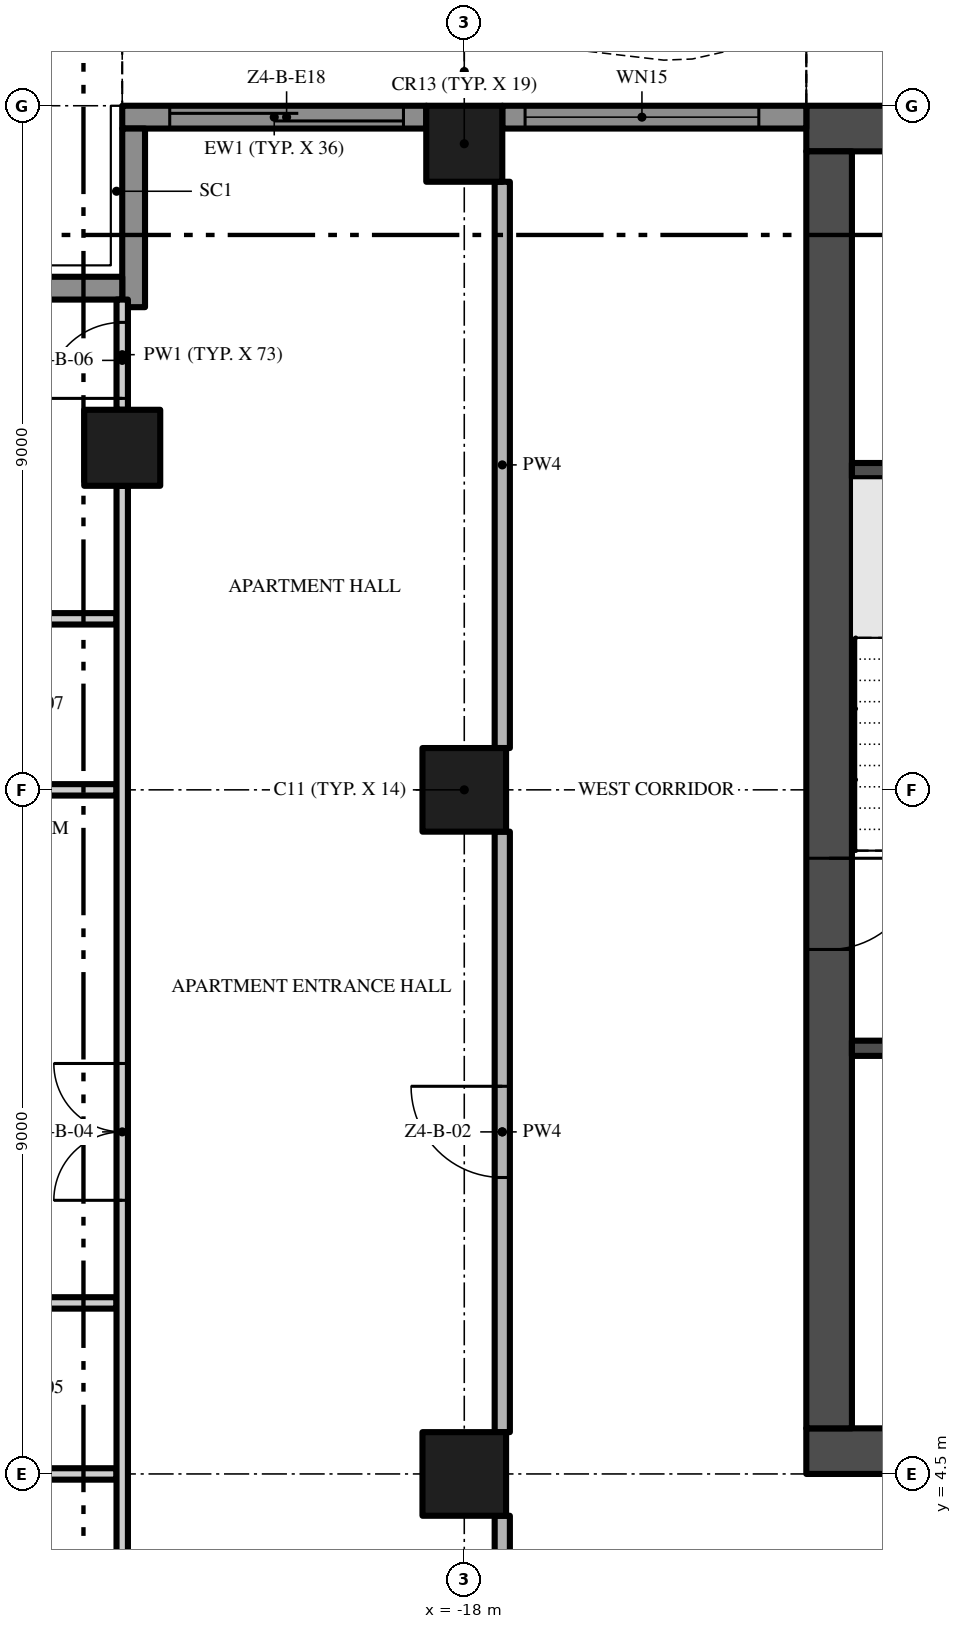
"""IFC4 building model, lengths in metres.
Left out: names, types, materials, properties, quantities, classifications, styles, units other than length and angle.
Written with IfcOpenShell. Run it as: python <this file> out.ifc"""

import sys

from ifc_helpers import new_model, si_unit, direction, frame, frame_2d, origin, origin_2d, place, context, subcontext, project, spatial, polyline, rectangle, outline, extrude, element, fill, save


model = new_model("IFC4")
c1 = context("Model", 3, precision=1e-05, world=origin(), true_north=direction((0.0, 1.0)))
c2 = subcontext(c1, "Body", "Model", "MODEL_VIEW")
j1 = project(units=[si_unit("LENGTHUNIT", "METRE"), si_unit("PLANEANGLEUNIT", "RADIAN")], contexts=[c1])
p1 = place(None, origin())
s1 = spatial("IfcSite", under=j1, at=p1, CompositionType="ELEMENT")
p2 = place(p1, origin())
s2 = spatial("IfcBuilding", under=s1, at=p2, CompositionType="ELEMENT")
p3 = place(p2, frame((0.0, 0.0, 199.6)))
s3 = spatial("IfcBuildingStorey", under=s2, at=p3, CompositionType="ELEMENT", Elevation=199.6)
p4 = place(p3, frame((-13.5, 4.8, -0.3), z_axis=(0.0, 0.0, 1.0), x_axis=(1.0, 0.0, 0.0)))
e1 = element("IfcWall", 1, at=p4, inside=s3, PredefinedType="SHEAR", context=c2, shape_type="SweptSolid", body=[
    extrude(rectangle(XDim=27.0, YDim=0.6, at=frame_2d((13.5, 0.0))), origin(), (0.0, 0.0, 1.0), 3.8),
])
p5 = place(p4, frame((12.0, 0.0, 0.3)))
e2 = element("IfcOpeningElement", 2, at=p5, cuts=e1, PredefinedType="OPENING", context=c2, shape_type="SweptSolid", body=[
    extrude(rectangle(XDim=3.0, YDim=2.4, at=frame_2d((1.5, 1.2))), frame((0.0, 0.31, 0.0), z_axis=(0.0, -1.0, 0.0), x_axis=(1.0, 0.0, 0.0)), (0.0, 0.0, 1.0), 0.62),
])
p6 = place(p4, frame((4.9, 0.0, 0.3)))
e3 = element("IfcOpeningElement", 3, at=p6, cuts=e1, PredefinedType="OPENING", context=c2, shape_type="SweptSolid", body=[
    extrude(rectangle(XDim=1.2, YDim=2.2, at=frame_2d((0.6, 1.1))), frame((0.0, 0.31, 0.0), z_axis=(0.0, -1.0, 0.0), x_axis=(1.0, 0.0, 0.0)), (0.0, 0.0, 1.0), 0.62),
])
p7 = place(p4, frame((20.75, 0.0, 0.3)))
e4 = element("IfcOpeningElement", 4, at=p7, cuts=e1, PredefinedType="OPENING", context=c2, shape_type="SweptSolid", body=[
    extrude(rectangle(XDim=1.5, YDim=2.2, at=frame_2d((0.75, 1.1))), frame((0.0, 0.31, 0.0), z_axis=(0.0, -1.0, 0.0), x_axis=(1.0, 0.0, 0.0)), (0.0, 0.0, 1.0), 0.62),
])
p8 = place(p4, frame((17.4, 0.0, 0.3)))
e5 = element("IfcOpeningElement", 5, at=p8, cuts=e1, PredefinedType="OPENING", context=c2, shape_type="SweptSolid", body=[
    extrude(rectangle(XDim=1.2, YDim=2.2, at=frame_2d((0.6, 1.1))), frame((0.0, 0.31, 0.0), z_axis=(0.0, -1.0, 0.0), x_axis=(1.0, 0.0, 0.0)), (0.0, 0.0, 1.0), 0.62),
])
p9 = place(p3, frame((13.5, 22.2, -0.3), z_axis=(0.0, 0.0, 1.0), x_axis=(-1.0, 0.0, 0.0)))
e6 = element("IfcWall", 6, at=p9, inside=s3, PredefinedType="SHEAR", context=c2, shape_type="SweptSolid", body=[
    extrude(rectangle(XDim=27.0, YDim=0.6, at=frame_2d((13.5, 0.0))), origin(), (0.0, 0.0, 1.0), 3.8),
])
p10 = place(p3, frame((-13.2, 21.9, -0.3), z_axis=(0.0, 0.0, 1.0), x_axis=(0.0, -1.0, 0.0)))
e7 = element("IfcWall", 7, at=p10, inside=s3, PredefinedType="SHEAR", context=c2, shape_type="SweptSolid", body=[
    extrude(rectangle(XDim=16.8, YDim=0.6, at=frame_2d((8.4, 0.0))), origin(), (0.0, 0.0, 1.0), 3.8),
])
p11 = place(p10, frame((9.3, 0.0, 0.3)))
e8 = element("IfcOpeningElement", 8, at=p11, cuts=e7, PredefinedType="OPENING", context=c2, shape_type="SweptSolid", body=[
    extrude(rectangle(XDim=1.2, YDim=2.2, at=frame_2d((0.6, 1.1))), frame((0.0, 0.31, 0.0), z_axis=(0.0, -1.0, 0.0), x_axis=(1.0, 0.0, 0.0)), (0.0, 0.0, 1.0), 0.62),
])
p12 = place(p3, frame((-18.0, 13.5, 0.0), z_axis=(0.0, 0.0, 1.0), x_axis=(1.0, 0.0, 0.0)))
e9 = element("IfcColumn", 9, at=p12, inside=s3, PredefinedType="COLUMN", context=c2, shape_type="SweptSolid", body=[
    extrude(rectangle(XDim=1.1, YDim=1.1, at=origin_2d()), origin(), (0.0, 0.0, 1.0), 3.5),
])
p13 = place(p3, frame((-18.0, 22.0, 0.0), z_axis=(0.0, 0.0, 1.0), x_axis=(1.0, 0.0, 0.0)))
e10 = element("IfcColumn", 10, at=p13, inside=s3, PredefinedType="COLUMN", context=c2, shape_type="SweptSolid", body=[
    extrude(rectangle(XDim=1.0, YDim=1.0, at=origin_2d()), origin(), (0.0, 0.0, 1.0), 3.5),
])
p14 = place(p3, frame((-18.0, 4.5, 0.0), z_axis=(0.0, 0.0, 1.0), x_axis=(1.0, 0.0, 0.0)))
e11 = element("IfcColumn", 11, at=p14, inside=s3, PredefinedType="COLUMN", context=c2, shape_type="SweptSolid", body=[
    extrude(rectangle(XDim=1.1, YDim=1.1, at=origin_2d()), origin(), (0.0, 0.0, 1.0), 3.5),
])
p15 = place(p3, frame((-22.5, 18.0, 0.0), z_axis=(0.0, 0.0, 1.0), x_axis=(1.0, 0.0, 0.0)))
e12 = element("IfcColumn", 12, at=p15, inside=s3, PredefinedType="COLUMN", context=c2, shape_type="SweptSolid", body=[
    extrude(rectangle(XDim=1.0, YDim=1.0, at=origin_2d()), origin(), (0.0, 0.0, 1.0), 3.5),
])
p16 = place(p3, frame((-17.5, 22.35, 0.0), z_axis=(0.0, 0.0, 1.0), x_axis=(1.0, 0.0, 0.0)))
e13 = element("IfcWall", 13, at=p16, inside=s3, PredefinedType="SOLIDWALL", context=c2, shape_type="SweptSolid", body=[
    extrude(rectangle(XDim=4.0, YDim=0.3, at=frame_2d((2.0, 0.0))), origin(), (0.0, 0.0, 1.0), 3.5),
])
p17 = place(p16, frame((0.3, 0.0, 0.45)))
e14 = element("IfcOpeningElement", 14, at=p17, cuts=e13, PredefinedType="OPENING", context=c2, shape_type="SweptSolid", body=[
    extrude(rectangle(XDim=3.075, YDim=2.65, at=frame_2d((1.538, 1.325))), frame((0.0, 0.16, 0.0), z_axis=(0.0, -1.0, 0.0), x_axis=(1.0, 0.0, 0.0)), (0.0, 0.0, 1.0), 0.32),
])
p18 = place(p3, frame((-22.5, 22.35, 0.0), z_axis=(0.0, 0.0, 1.0), x_axis=(1.0, 0.0, 0.0)))
e15 = element("IfcWall", 15, at=p18, inside=s3, PredefinedType="SOLIDWALL", context=c2, shape_type="SweptSolid", body=[
    extrude(rectangle(XDim=4.0, YDim=0.3, at=frame_2d((2.0, 0.0))), origin(), (0.0, 0.0, 1.0), 3.5),
])
p19 = place(p18, frame((0.625, 0.0, 0.0)))
e16 = element("IfcOpeningElement", 16, at=p19, cuts=e15, PredefinedType="OPENING", context=c2, shape_type="SweptSolid", body=[
    extrude(rectangle(XDim=3.075, YDim=2.4, at=frame_2d((1.538, 1.2))), frame((0.0, 0.16, 0.0), z_axis=(0.0, -1.0, 0.0), x_axis=(1.0, 0.0, 0.0)), (0.0, 0.0, 1.0), 0.32),
])
p20 = place(p3, frame((-22.35, 19.85, 0.0), z_axis=(0.0, 0.0, 1.0), x_axis=(0.0, 1.0, 0.0)))
e17 = element("IfcWall", 17, at=p20, inside=s3, PredefinedType="SOLIDWALL", context=c2, shape_type="SweptSolid", body=[
    extrude(rectangle(XDim=2.35, YDim=0.3, at=frame_2d((1.175, 0.0))), origin(), (0.0, 0.0, 1.0), 3.5),
])
p21 = place(p3, frame((-24.75, 20.1, 0.0), z_axis=(0.0, 0.0, 1.0), x_axis=(1.0, 0.0, 0.0)))
e18 = element("IfcWall", 18, at=p21, inside=s3, PredefinedType="SOLIDWALL", context=c2, shape_type="SweptSolid", body=[
    extrude(rectangle(XDim=2.25, YDim=0.3, at=frame_2d((1.125, 0.0))), origin(), (0.0, 0.0, 1.0), 3.5),
])
p22 = place(p3, origin())
e19 = element("IfcWall", 19, at=p22, inside=s3, PredefinedType="USERDEFINED", context=c2, shape_type="SweptSolid", body=[
    extrude(outline(polyline([(-13.5, 23.451), (-15.0, 23.115), (-15.375, 23.1), (-16.5, 23.231), (-18.0, 23.755), (-19.5, 24.488), (-21.0, 25.149), (-22.5, 25.485), (-22.555, 25.241), (-21.079, 24.91), (-19.605, 24.261), (-18.096, 23.524), (-16.556, 22.986), (-15.385, 22.849), (-14.967, 22.866), (-13.445, 23.208), (-13.5, 23.451)])), origin(), (0.0, 0.0, 1.0), 0.9),
])
for number, where, z_axis, x_axis in (
    (20, (-12.9, 10.1, 0.0), (0.0, 0.0, 1.0), (1.0, 0.0, 0.0)),
    (21, (-12.9, 17.7, 0.0), (0.0, 0.0, 1.0), (1.0, 0.0, 0.0)),
):
    element("IfcWall", number, at=place(p3, frame(where, z_axis=z_axis, x_axis=x_axis)), inside=s3, PredefinedType="SHEAR", context=c2, shape_type="SweptSolid", body=[
        extrude(rectangle(XDim=3.25, YDim=0.2, at=frame_2d((1.625, 0.0))), origin(), (0.0, 0.0, 1.0), 3.5),
    ])
p23 = place(p3, frame((-26.0, 4.5, 0.0), z_axis=(0.0, 0.0, 1.0), x_axis=(1.0, 0.0, 0.0)))
e22 = element("IfcWall", 22, at=p23, inside=s3, PredefinedType="PARTITIONING", context=c2, shape_type="SweptSolid", body=[
    extrude(rectangle(XDim=3.425, YDim=0.15, at=frame_2d((1.712, 0.0))), origin(), (0.0, 0.0, 1.0), 3.5),
])
p24 = place(p3, frame((-24.45, 6.75, 0.0), z_axis=(0.0, 0.0, 1.0), x_axis=(1.0, 0.0, 0.0)))
e23 = element("IfcWall", 23, at=p24, inside=s3, PredefinedType="PARTITIONING", context=c2, shape_type="SweptSolid", body=[
    extrude(rectangle(XDim=1.875, YDim=0.15, at=frame_2d((0.938, 0.0))), origin(), (0.0, 0.0, 1.0), 3.5),
])
p25 = place(p3, frame((-26.0, 13.5, 0.0), z_axis=(0.0, 0.0, 1.0), x_axis=(1.0, 0.0, 0.0)))
e24 = element("IfcWall", 24, at=p25, inside=s3, PredefinedType="PARTITIONING", context=c2, shape_type="SweptSolid", body=[
    extrude(rectangle(XDim=3.425, YDim=0.15, at=frame_2d((1.712, 0.0))), origin(), (0.0, 0.0, 1.0), 3.5),
])
p26 = place(p3, frame((-24.45, 15.75, 0.0), z_axis=(0.0, 0.0, 1.0), x_axis=(1.0, 0.0, 0.0)))
e25 = element("IfcWall", 25, at=p26, inside=s3, PredefinedType="PARTITIONING", context=c2, shape_type="SweptSolid", body=[
    extrude(rectangle(XDim=1.875, YDim=0.15, at=frame_2d((0.938, 0.0))), origin(), (0.0, 0.0, 1.0), 3.5),
])
p27 = place(p3, frame((-22.5, 0.1, 0.0), z_axis=(0.0, 0.0, 1.0), x_axis=(0.0, 1.0, 0.0)))
e26 = element("IfcWall", 26, at=p27, inside=s3, PredefinedType="PARTITIONING", context=c2, shape_type="SweptSolid", body=[
    extrude(rectangle(XDim=17.4, YDim=0.15, at=frame_2d((8.7, 0.0))), origin(), (0.0, 0.0, 1.0), 3.5),
])
p28 = place(p27, frame((1.65, 0.0, 0.0)))
e27 = element("IfcOpeningElement", 27, at=p28, cuts=e26, PredefinedType="OPENING", context=c2, shape_type="SweptSolid", body=[
    extrude(rectangle(XDim=1.0, YDim=2.4, at=frame_2d((0.5, 1.2))), frame((0.0, 0.085, 0.0), z_axis=(0.0, -1.0, 0.0), x_axis=(1.0, 0.0, 0.0)), (0.0, 0.0, 1.0), 0.17),
])
p29 = place(p27, frame((8.0, 0.0, 0.0)))
e28 = element("IfcOpeningElement", 28, at=p29, cuts=e26, PredefinedType="OPENING", context=c2, shape_type="SweptSolid", body=[
    extrude(rectangle(XDim=1.8, YDim=2.4, at=frame_2d((0.9, 1.2))), frame((0.0, 0.085, 0.0), z_axis=(0.0, -1.0, 0.0), x_axis=(1.0, 0.0, 0.0)), (0.0, 0.0, 1.0), 0.17),
])
p30 = place(p3, frame((-22.5, 18.5, 0.0), z_axis=(0.0, 0.0, 1.0), x_axis=(0.0, 1.0, 0.0)))
e29 = element("IfcWall", 29, at=p30, inside=s3, PredefinedType="PARTITIONING", context=c2, shape_type="SweptSolid", body=[
    extrude(rectangle(XDim=1.45, YDim=0.15, at=frame_2d((0.725, 0.0))), origin(), (0.0, 0.0, 1.0), 3.5),
])
p31 = place(p30, frame((0.15, 0.0, 0.0)))
e30 = element("IfcOpeningElement", 30, at=p31, cuts=e29, PredefinedType="OPENING", context=c2, shape_type="SweptSolid", body=[
    extrude(rectangle(XDim=1.0, YDim=2.4, at=frame_2d((0.5, 1.2))), frame((0.0, 0.085, 0.0), z_axis=(0.0, -1.0, 0.0), x_axis=(1.0, 0.0, 0.0)), (0.0, 0.0, 1.0), 0.17),
])
p32 = place(p3, frame((-17.5, -0.2, 0.0), z_axis=(0.0, 0.0, 1.0), x_axis=(0.0, 1.0, 0.0)))
e31 = element("IfcWall", 31, at=p32, inside=s3, PredefinedType="PARTITIONING", context=c2, shape_type="SweptSolid", body=[
    extrude(rectangle(XDim=4.15, YDim=0.2, at=frame_2d((2.075, 0.0))), origin(), (0.0, 0.0, 1.0), 3.5),
])
p33 = place(p3, frame((-17.5, 5.05, 0.0), z_axis=(0.0, 0.0, 1.0), x_axis=(0.0, 1.0, 0.0)))
e32 = element("IfcWall", 32, at=p33, inside=s3, PredefinedType="PARTITIONING", context=c2, shape_type="SweptSolid", body=[
    extrude(rectangle(XDim=7.9, YDim=0.2, at=frame_2d((3.95, 0.0))), origin(), (0.0, 0.0, 1.0), 3.5),
])
p34 = place(p33, frame((3.35, 0.0, 0.0)))
e33 = element("IfcOpeningElement", 33, at=p34, cuts=e32, PredefinedType="OPENING", context=c2, shape_type="SweptSolid", body=[
    extrude(rectangle(XDim=1.2, YDim=2.4, at=frame_2d((0.6, 1.2))), frame((0.0, 0.11, 0.0), z_axis=(0.0, -1.0, 0.0), x_axis=(1.0, 0.0, 0.0)), (0.0, 0.0, 1.0), 0.22),
])
p35 = place(p3, frame((-17.5, 14.05, 0.0), z_axis=(0.0, 0.0, 1.0), x_axis=(0.0, 1.0, 0.0)))
e34 = element("IfcWall", 34, at=p35, inside=s3, PredefinedType="PARTITIONING", context=c2, shape_type="SweptSolid", body=[
    extrude(rectangle(XDim=7.45, YDim=0.2, at=frame_2d((3.725, 0.0))), origin(), (0.0, 0.0, 1.0), 3.5),
])
p36 = place(p17, origin())
e35 = element("IfcWindow", 35, at=p36, inside=s3, PartitioningType="SINGLE_PANEL", PredefinedType="WINDOW", context=c2, shape_type="SweptSolid", body=[
    extrude(rectangle(XDim=3.075, YDim=2.65, at=frame_2d((1.538, 1.325))), frame((0.0, 0.03, 0.0), z_axis=(0.0, -1.0, 0.0), x_axis=(1.0, 0.0, 0.0)), (0.0, 0.0, 1.0), 0.06),
])
fill(e14, e35)
p37 = place(p19, origin())
e36 = element("IfcDoor", 36, at=p37, inside=s3, OperationType="SINGLE_SWING_LEFT", PredefinedType="DOOR", context=c2, shape_type="SweptSolid", body=[
    extrude(rectangle(XDim=3.075, YDim=2.4, at=frame_2d((1.538, 1.2))), frame((0.0, 0.025, 0.0), z_axis=(0.0, -1.0, 0.0), x_axis=(1.0, 0.0, 0.0)), (0.0, 0.0, 1.0), 0.05),
])
fill(e16, e36)
p38 = place(p11, frame((1.2, 0.0, 0.0), z_axis=(0.0, 0.0, 1.0), x_axis=(-1.0, 0.0, 0.0)))
e37 = element("IfcDoor", 37, at=p38, inside=s3, OperationType="SINGLE_SWING_RIGHT", PredefinedType="DOOR", context=c2, shape_type="SweptSolid", body=[
    extrude(rectangle(XDim=1.2, YDim=2.2, at=frame_2d((0.6, 1.1))), frame((0.0, 0.025, 0.0), z_axis=(0.0, -1.0, 0.0), x_axis=(1.0, 0.0, 0.0)), (0.0, 0.0, 1.0), 0.05),
])
fill(e8, e37)
p39 = place(p34, origin())
e38 = element("IfcDoor", 38, at=p39, inside=s3, OperationType="SINGLE_SWING_RIGHT", PredefinedType="DOOR", context=c2, shape_type="SweptSolid", body=[
    extrude(rectangle(XDim=1.2, YDim=2.4, at=frame_2d((0.6, 1.2))), frame((0.0, 0.025, 0.0), z_axis=(0.0, -1.0, 0.0), x_axis=(1.0, 0.0, 0.0)), (0.0, 0.0, 1.0), 0.05),
])
fill(e33, e38)
p40 = place(p29, origin())
e39 = element("IfcDoor", 39, at=p40, inside=s3, OperationType="DOUBLE_DOOR_SINGLE_SWING", PredefinedType="DOOR", context=c2, shape_type="SweptSolid", body=[
    extrude(rectangle(XDim=1.8, YDim=2.4, at=frame_2d((0.9, 1.2))), frame((0.0, 0.025, 0.0), z_axis=(0.0, -1.0, 0.0), x_axis=(1.0, 0.0, 0.0)), (0.0, 0.0, 1.0), 0.05),
])
fill(e28, e39)
p41 = place(p31, origin())
e40 = element("IfcDoor", 40, at=p41, inside=s3, OperationType="SINGLE_SWING_LEFT", PredefinedType="DOOR", context=c2, shape_type="SweptSolid", body=[
    extrude(rectangle(XDim=1.0, YDim=2.4, at=frame_2d((0.5, 1.2))), frame((0.0, 0.025, 0.0), z_axis=(0.0, -1.0, 0.0), x_axis=(1.0, 0.0, 0.0)), (0.0, 0.0, 1.0), 0.05),
])
fill(e30, e40)
save(model, sys.argv[1])
